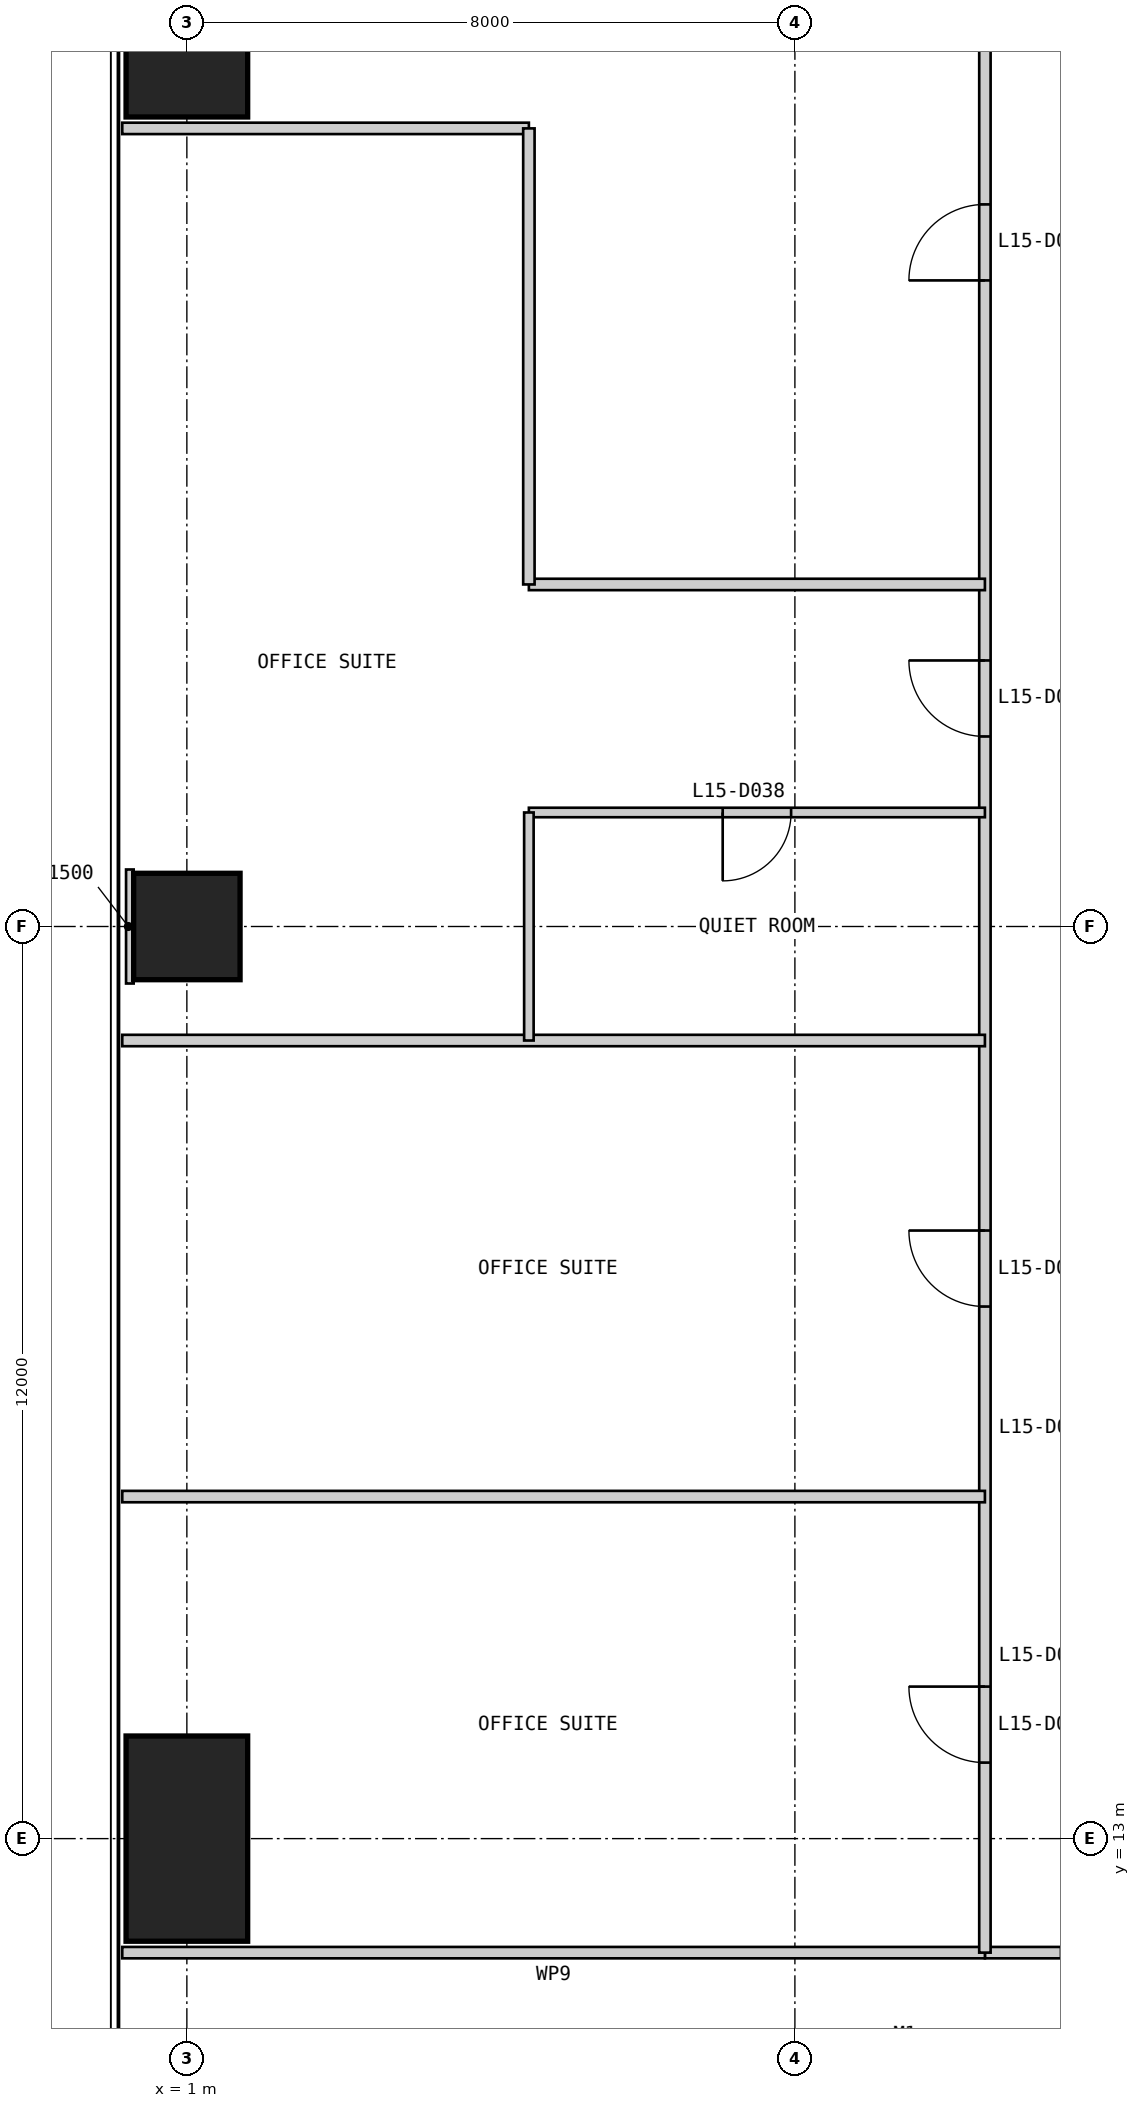
"""IFC4 building model, lengths in metres.
Left out: names, types, materials, properties, quantities, classifications, styles, units other than length and angle.
Written with IfcOpenShell. Run it as: python <this file> out.ifc"""

import sys

from ifc_helpers import new_model, si_unit, direction, frame, frame_2d, origin, origin_2d, place, context, subcontext, project, spatial, rectangle, extrude, element, fill, save


model = new_model("IFC4")
c1 = context("Model", 3, precision=1e-05, world=origin(), true_north=direction((0.0, 1.0)))
c2 = subcontext(c1, "Body", "Model", "MODEL_VIEW")
j1 = project(units=[si_unit("LENGTHUNIT", "METRE"), si_unit("PLANEANGLEUNIT", "RADIAN")], contexts=[c1])
p1 = place(None, origin())
s1 = spatial("IfcSite", under=j1, at=p1, CompositionType="ELEMENT")
p2 = place(p1, origin())
s2 = spatial("IfcBuilding", under=s1, at=p2, CompositionType="ELEMENT")
p3 = place(p2, frame((0.0, 0.0, 67.0)))
s3 = spatial("IfcBuildingStorey", under=s2, at=p3, CompositionType="ELEMENT", Elevation=67.0)
p4 = place(p3, frame((1.0, 37.0, 0.0), z_axis=(0.0, 0.0, 1.0), x_axis=(1.0, 0.0, 0.0)))
e1 = element("IfcColumn", 1, at=p4, inside=s3, PredefinedType="COLUMN", context=c2, shape_type="SweptSolid", body=[
    extrude(rectangle(XDim=1.6, YDim=2.7, at=origin_2d()), origin(), (0.0, 0.0, 1.0), 4.0),
])
p5 = place(p3, frame((1.0, 25.0, 0.0), z_axis=(0.0, 0.0, 1.0), x_axis=(1.0, 0.0, 0.0)))
e2 = element("IfcColumn", 2, at=p5, inside=s3, PredefinedType="COLUMN", context=c2, shape_type="SweptSolid", body=[
    extrude(rectangle(XDim=1.4, YDim=1.4, at=origin_2d()), origin(), (0.0, 0.0, 1.0), 4.0),
])
p6 = place(p3, frame((1.0, 13.0, 0.0), z_axis=(0.0, 0.0, 1.0), x_axis=(1.0, 0.0, 0.0)))
e3 = element("IfcColumn", 3, at=p6, inside=s3, PredefinedType="COLUMN", context=c2, shape_type="SweptSolid", body=[
    extrude(rectangle(XDim=1.6, YDim=2.7, at=origin_2d()), origin(), (0.0, 0.0, 1.0), 4.0),
])
p7 = place(p3, frame((11.5, 11.5, 0.0), z_axis=(0.0, 0.0, 1.0), x_axis=(1.0, 0.0, 0.0)))
e4 = element("IfcWall", 4, at=p7, inside=s3, PredefinedType="PARTITIONING", context=c2, shape_type="SweptSolid", body=[
    extrude(rectangle(XDim=27.0, YDim=0.15, at=frame_2d((13.5, 0.0))), origin(), (0.0, 0.0, 1.0), 3.85),
])
p8 = place(p7, frame((1.0, 0.0, 0.0)))
e5 = element("IfcOpeningElement", 5, at=p8, cuts=e4, PredefinedType="OPENING", context=c2, shape_type="SweptSolid", body=[
    extrude(rectangle(XDim=1.0, YDim=2.2, at=frame_2d((0.5, 1.1))), frame((0.0, 0.085, 0.0), z_axis=(0.0, -1.0, 0.0), x_axis=(1.0, 0.0, 0.0)), (0.0, 0.0, 1.0), 0.17),
])
p9 = place(p7, frame((5.5, 0.0, 0.0)))
e6 = element("IfcOpeningElement", 6, at=p9, cuts=e4, PredefinedType="OPENING", context=c2, shape_type="SweptSolid", body=[
    extrude(rectangle(XDim=1.0, YDim=2.2, at=frame_2d((0.5, 1.1))), frame((0.0, 0.085, 0.0), z_axis=(0.0, -1.0, 0.0), x_axis=(1.0, 0.0, 0.0)), (0.0, 0.0, 1.0), 0.17),
])
p10 = place(p7, frame((11.5, 0.0, 0.0)))
e7 = element("IfcOpeningElement", 7, at=p10, cuts=e4, PredefinedType="OPENING", context=c2, shape_type="SweptSolid", body=[
    extrude(rectangle(XDim=1.0, YDim=2.2, at=frame_2d((0.5, 1.1))), frame((0.0, 0.085, 0.0), z_axis=(0.0, -1.0, 0.0), x_axis=(1.0, 0.0, 0.0)), (0.0, 0.0, 1.0), 0.17),
])
p11 = place(p7, frame((19.0, 0.0, 0.0)))
e8 = element("IfcOpeningElement", 8, at=p11, cuts=e4, PredefinedType="OPENING", context=c2, shape_type="SweptSolid", body=[
    extrude(rectangle(XDim=1.0, YDim=2.2, at=frame_2d((0.5, 1.1))), frame((0.0, 0.085, 0.0), z_axis=(0.0, -1.0, 0.0), x_axis=(1.0, 0.0, 0.0)), (0.0, 0.0, 1.0), 0.17),
])
p12 = place(p3, frame((0.15, 11.5, 0.0), z_axis=(0.0, 0.0, 1.0), x_axis=(1.0, 0.0, 0.0)))
e9 = element("IfcWall", 9, at=p12, inside=s3, PredefinedType="PARTITIONING", context=c2, shape_type="SweptSolid", body=[
    extrude(rectangle(XDim=11.35, YDim=0.15, at=frame_2d((5.675, 0.0))), origin(), (0.0, 0.0, 1.0), 3.85),
])
p13 = place(p3, frame((11.5, 38.5, 0.0), z_axis=(0.0, 0.0, 1.0), x_axis=(0.0, -1.0, 0.0)))
e10 = element("IfcWall", 10, at=p13, inside=s3, PredefinedType="PARTITIONING", context=c2, shape_type="SweptSolid", body=[
    extrude(rectangle(XDim=27.0, YDim=0.15, at=frame_2d((13.5, 0.0))), origin(), (0.0, 0.0, 1.0), 3.85),
])
p14 = place(p13, frame((4.0, 0.0, 0.0)))
e11 = element("IfcOpeningElement", 11, at=p14, cuts=e10, PredefinedType="OPENING", context=c2, shape_type="SweptSolid", body=[
    extrude(rectangle(XDim=1.0, YDim=2.2, at=frame_2d((0.5, 1.1))), frame((0.0, 0.085, 0.0), z_axis=(0.0, -1.0, 0.0), x_axis=(1.0, 0.0, 0.0)), (0.0, 0.0, 1.0), 0.17),
])
p15 = place(p13, frame((10.0, 0.0, 0.0)))
e12 = element("IfcOpeningElement", 12, at=p15, cuts=e10, PredefinedType="OPENING", context=c2, shape_type="SweptSolid", body=[
    extrude(rectangle(XDim=1.0, YDim=2.2, at=frame_2d((0.5, 1.1))), frame((0.0, 0.085, 0.0), z_axis=(0.0, -1.0, 0.0), x_axis=(1.0, 0.0, 0.0)), (0.0, 0.0, 1.0), 0.17),
])
p16 = place(p13, frame((17.5, 0.0, 0.0)))
e13 = element("IfcOpeningElement", 13, at=p16, cuts=e10, PredefinedType="OPENING", context=c2, shape_type="SweptSolid", body=[
    extrude(rectangle(XDim=1.0, YDim=2.2, at=frame_2d((0.5, 1.1))), frame((0.0, 0.085, 0.0), z_axis=(0.0, -1.0, 0.0), x_axis=(1.0, 0.0, 0.0)), (0.0, 0.0, 1.0), 0.17),
])
p17 = place(p13, frame((23.5, 0.0, 0.0)))
e14 = element("IfcOpeningElement", 14, at=p17, cuts=e10, PredefinedType="OPENING", context=c2, shape_type="SweptSolid", body=[
    extrude(rectangle(XDim=1.0, YDim=2.2, at=frame_2d((0.5, 1.1))), frame((0.0, 0.085, 0.0), z_axis=(0.0, -1.0, 0.0), x_axis=(1.0, 0.0, 0.0)), (0.0, 0.0, 1.0), 0.17),
])
p18 = place(p3, frame((0.15, 35.5, 0.0), z_axis=(0.0, 0.0, 1.0), x_axis=(1.0, 0.0, 0.0)))
e15 = element("IfcWall", 15, at=p18, inside=s3, PredefinedType="PARTITIONING", context=c2, shape_type="SweptSolid", body=[
    extrude(rectangle(XDim=5.35, YDim=0.15, at=frame_2d((2.675, 0.0))), origin(), (0.0, 0.0, 1.0), 3.85),
])
p19 = place(p3, frame((5.5, 29.5, 0.0), z_axis=(0.0, 0.0, 1.0), x_axis=(1.0, 0.0, 0.0)))
e16 = element("IfcWall", 16, at=p19, inside=s3, PredefinedType="PARTITIONING", context=c2, shape_type="SweptSolid", body=[
    extrude(rectangle(XDim=6.0, YDim=0.15, at=frame_2d((3.0, 0.0))), origin(), (0.0, 0.0, 1.0), 3.85),
])
p20 = place(p3, frame((5.5, 26.5, 0.0), z_axis=(0.0, 0.0, 1.0), x_axis=(1.0, 0.0, 0.0)))
e17 = element("IfcWall", 17, at=p20, inside=s3, PredefinedType="PARTITIONING", context=c2, shape_type="SweptSolid", body=[
    extrude(rectangle(XDim=6.0, YDim=0.125, at=frame_2d((3.0, 0.0))), origin(), (0.0, 0.0, 1.0), 3.85),
])
p21 = place(p20, frame((2.55, 0.0, 0.0)))
e18 = element("IfcOpeningElement", 18, at=p21, cuts=e17, PredefinedType="OPENING", context=c2, shape_type="SweptSolid", body=[
    extrude(rectangle(XDim=0.9, YDim=2.2, at=frame_2d((0.45, 1.1))), frame((0.0, 0.073, 0.0), z_axis=(0.0, -1.0, 0.0), x_axis=(1.0, 0.0, 0.0)), (0.0, 0.0, 1.0), 0.145),
])
for number, where, z_axis, x_axis in (
    (19, (0.15, 23.5, 0.0), (0.0, 0.0, 1.0), (1.0, 0.0, 0.0)),
    (20, (0.15, 17.5, 0.0), (0.0, 0.0, 1.0), (1.0, 0.0, 0.0)),
):
    element("IfcWall", number, at=place(p3, frame(where, z_axis=z_axis, x_axis=x_axis)), inside=s3, PredefinedType="PARTITIONING", context=c2, shape_type="SweptSolid", body=[
        extrude(rectangle(XDim=11.35, YDim=0.15, at=frame_2d((5.675, 0.0))), origin(), (0.0, 0.0, 1.0), 3.85),
    ])
p22 = place(p3, frame((5.5, 35.5, 0.0), z_axis=(0.0, 0.0, 1.0), x_axis=(0.0, -1.0, 0.0)))
e21 = element("IfcWall", 21, at=p22, inside=s3, PredefinedType="PARTITIONING", context=c2, shape_type="SweptSolid", body=[
    extrude(rectangle(XDim=6.0, YDim=0.15, at=frame_2d((3.0, 0.0))), origin(), (0.0, 0.0, 1.0), 3.85),
])
p23 = place(p3, frame((5.5, 26.5, 0.0), z_axis=(0.0, 0.0, 1.0), x_axis=(0.0, -1.0, 0.0)))
e22 = element("IfcWall", 22, at=p23, inside=s3, PredefinedType="PARTITIONING", context=c2, shape_type="SweptSolid", body=[
    extrude(rectangle(XDim=3.0, YDim=0.125, at=frame_2d((1.5, 0.0))), origin(), (0.0, 0.0, 1.0), 3.85),
])
p24 = place(p3, frame((0.2, 25.0, 0.0), z_axis=(0.0, 0.0, 1.0), x_axis=(1.0, 0.0, 0.0)))
e23 = element("IfcWall", 23, at=p24, inside=s3, PredefinedType="PARTITIONING", context=c2, shape_type="SweptSolid", body=[
    extrude(rectangle(XDim=0.1, YDim=1.5, at=frame_2d((0.05, 0.0))), origin(), (0.0, 0.0, 1.0), 3.85),
])
p25 = place(p14, frame((1.0, 0.0, 0.0), z_axis=(0.0, 0.0, 1.0), x_axis=(-1.0, 0.0, 0.0)))
e24 = element("IfcDoor", 24, at=p25, inside=s3, OperationType="SINGLE_SWING_LEFT", PredefinedType="DOOR", context=c2, shape_type="SweptSolid", body=[
    extrude(rectangle(XDim=1.0, YDim=2.2, at=frame_2d((0.5, 1.1))), frame((0.0, 0.025, 0.0), z_axis=(0.0, -1.0, 0.0), x_axis=(1.0, 0.0, 0.0)), (0.0, 0.0, 1.0), 0.05),
])
fill(e11, e24)
p26 = place(p15, frame((1.0, 0.0, 0.0), z_axis=(0.0, 0.0, 1.0), x_axis=(-1.0, 0.0, 0.0)))
e25 = element("IfcDoor", 25, at=p26, inside=s3, OperationType="SINGLE_SWING_RIGHT", PredefinedType="DOOR", context=c2, shape_type="SweptSolid", body=[
    extrude(rectangle(XDim=1.0, YDim=2.2, at=frame_2d((0.5, 1.1))), frame((0.0, 0.025, 0.0), z_axis=(0.0, -1.0, 0.0), x_axis=(1.0, 0.0, 0.0)), (0.0, 0.0, 1.0), 0.05),
])
fill(e12, e25)
p27 = place(p21, frame((0.9, 0.0, 0.0), z_axis=(0.0, 0.0, 1.0), x_axis=(-1.0, 0.0, 0.0)))
e26 = element("IfcDoor", 26, at=p27, inside=s3, OperationType="SINGLE_SWING_RIGHT", PredefinedType="DOOR", context=c2, shape_type="SweptSolid", body=[
    extrude(rectangle(XDim=0.9, YDim=2.2, at=frame_2d((0.45, 1.1))), frame((0.0, 0.025, 0.0), z_axis=(0.0, -1.0, 0.0), x_axis=(1.0, 0.0, 0.0)), (0.0, 0.0, 1.0), 0.05),
])
fill(e18, e26)
p28 = place(p16, frame((1.0, 0.0, 0.0), z_axis=(0.0, 0.0, 1.0), x_axis=(-1.0, 0.0, 0.0)))
e27 = element("IfcDoor", 27, at=p28, inside=s3, OperationType="SINGLE_SWING_RIGHT", PredefinedType="DOOR", context=c2, shape_type="SweptSolid", body=[
    extrude(rectangle(XDim=1.0, YDim=2.2, at=frame_2d((0.5, 1.1))), frame((0.0, 0.025, 0.0), z_axis=(0.0, -1.0, 0.0), x_axis=(1.0, 0.0, 0.0)), (0.0, 0.0, 1.0), 0.05),
])
fill(e13, e27)
p29 = place(p17, frame((1.0, 0.0, 0.0), z_axis=(0.0, 0.0, 1.0), x_axis=(-1.0, 0.0, 0.0)))
e28 = element("IfcDoor", 28, at=p29, inside=s3, OperationType="SINGLE_SWING_RIGHT", PredefinedType="DOOR", context=c2, shape_type="SweptSolid", body=[
    extrude(rectangle(XDim=1.0, YDim=2.2, at=frame_2d((0.5, 1.1))), frame((0.0, 0.025, 0.0), z_axis=(0.0, -1.0, 0.0), x_axis=(1.0, 0.0, 0.0)), (0.0, 0.0, 1.0), 0.05),
])
fill(e14, e28)
save(model, sys.argv[1])
